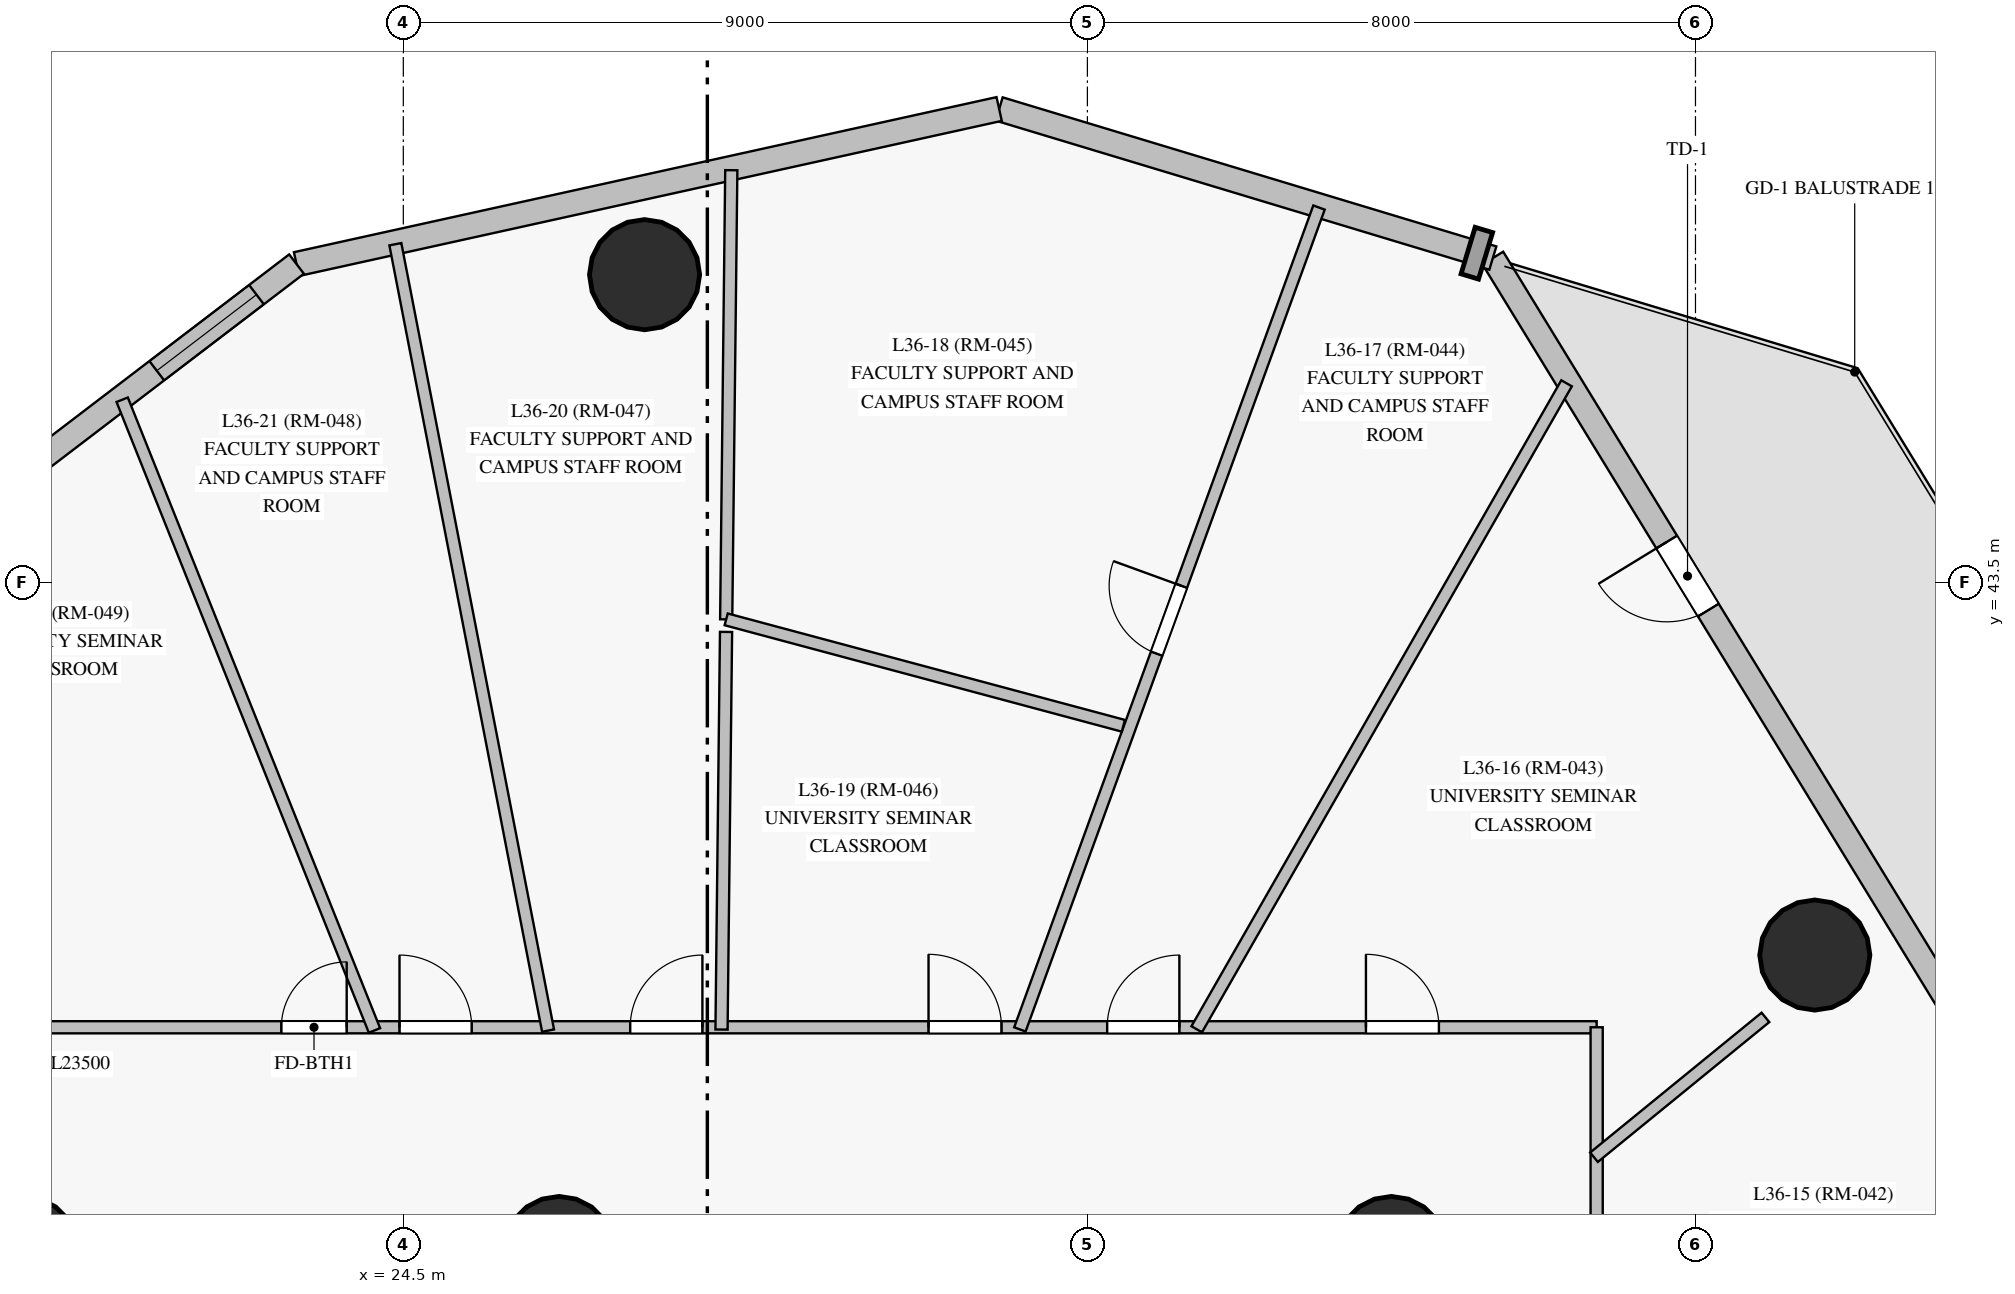
"""IFC4 building model, lengths in metres.
Left out: names, types, materials, properties, quantities, classifications, styles, units other than length and angle.
Written with IfcOpenShell. Run it as: python <this file> out.ifc"""

import sys

from ifc_helpers import new_model, si_unit, direction, frame, frame_2d, origin, origin_with_axes, origin_2d, place, context, subcontext, project, spatial, rectangle, circle, extrude, source, transform, mapped, element, fill, save


model = new_model("IFC4")
c1 = context("Model", 3, precision=1e-05, world=origin(), true_north=direction((0.0, 1.0)))
c2 = subcontext(c1, "Body", "Model", "MODEL_VIEW")
j1 = project(units=[si_unit("LENGTHUNIT", "METRE"), si_unit("PLANEANGLEUNIT", "RADIAN")], contexts=[c1])
p1 = place(None, origin())
s1 = spatial("IfcSite", under=j1, at=p1, CompositionType="ELEMENT")
p2 = place(p1, origin())
s2 = spatial("IfcBuilding", under=s1, at=p2, CompositionType="ELEMENT")
p3 = place(p2, frame((0.0, 0.0, 129.75)))
s3 = spatial("IfcBuildingStorey", under=s2, at=p3, CompositionType="ELEMENT", Elevation=129.75)
m1 = source(origin_with_axes(), c2, "Body", "SweptSolid", [
    extrude(circle(Radius=0.725, at=origin_2d()), origin(), (0.0, 0.0, 1.0), 3.05),
])
for number, where, z_axis, x_axis in (
    (1, (19.5, 34.7, 0.0), (0.0, 0.0, 1.0), (1.0, 0.0, 0.0)),
    (2, (26.55, 34.7, 0.0), (0.0, 0.0, 1.0), (1.0, 0.0, 0.0)),
    (3, (37.5, 34.7, 0.0), (0.0, 0.0, 1.0), (1.0, 0.0, 0.0)),
    (4, (43.07, 38.6, 0.0), (0.0, 0.0, 1.0), (1.0, 0.0, 0.0)),
    (5, (27.674, 47.551, 0.0), (0.0, 0.0, 1.0), (1.0, 0.0, 0.0)),
):
    element("IfcColumn", number, at=place(p3, frame(where, z_axis=z_axis, x_axis=x_axis)), inside=s3, PredefinedType="COLUMN", context=c2, shape_type="MappedRepresentation", body=[
        mapped(m1, transform((0.0, 0.0, 0.0), scale=1.0)),
    ])
p4 = place(p3, frame((47.615, 33.425, 0.0), z_axis=(0.0, 0.0, 1.0), x_axis=(-0.522110980626, 0.852877555051, 0.0)))
e6 = element("IfcWall", 6, at=p4, inside=s3, PredefinedType="SOLIDWALL", context=c2, shape_type="SweptSolid", body=[
    extrude(rectangle(XDim=16.819, YDim=0.32, at=frame_2d((8.41, 0.0))), origin(), (0.0, 0.0, 1.0), 2.495),
])
p5 = place(p4, frame((11.388, 0.0, 0.0)))
e7 = element("IfcOpeningElement", 7, at=p5, cuts=e6, PredefinedType="OPENING", context=c2, shape_type="SweptSolid", body=[
    extrude(rectangle(XDim=1.05, YDim=2.12, at=frame_2d((0.525, 1.06))), frame((0.0, 0.17, 0.0), z_axis=(0.0, -1.0, 0.0), x_axis=(1.0, 0.0, 0.0)), (0.0, 0.0, 1.0), 0.34),
])
p6 = place(p3, frame((38.834, 47.77, 0.0), z_axis=(0.0, 0.0, 1.0), x_axis=(-0.957328650051, 0.289001480606, 0.0)))
e8 = element("IfcWall", 8, at=p6, inside=s3, PredefinedType="SOLIDWALL", context=c2, shape_type="SweptSolid", body=[
    extrude(rectangle(XDim=6.784, YDim=0.32, at=frame_2d((3.392, 0.0))), origin(), (0.0, 0.0, 1.0), 2.495),
])
p7 = place(p3, frame((32.339, 49.731, 0.0), z_axis=(0.0, 0.0, 1.0), x_axis=(-0.97649735888, -0.215529367144, 0.0)))
e9 = element("IfcWall", 9, at=p7, inside=s3, PredefinedType="SOLIDWALL", context=c2, shape_type="SweptSolid", body=[
    extrude(rectangle(XDim=9.466, YDim=0.32, at=frame_2d((4.733, 0.0))), origin(), (0.0, 0.0, 1.0), 2.825),
])
p8 = place(p3, frame((23.095, 47.69, 0.0), z_axis=(0.0, 0.0, 1.0), x_axis=(-0.794946718948, -0.606679251363, 0.0)))
e10 = element("IfcWall", 10, at=p8, inside=s3, PredefinedType="SOLIDWALL", context=c2, shape_type="SweptSolid", body=[
    extrude(rectangle(XDim=13.689, YDim=0.32, at=frame_2d((6.844, 0.0))), origin(), (0.0, 0.0, 1.0), 2.825),
])
p9 = place(p8, frame((0.663, 0.0, 0.85)))
e11 = element("IfcOpeningElement", 11, at=p9, cuts=e10, PredefinedType="OPENING", context=c2, shape_type="SweptSolid", body=[
    extrude(rectangle(XDim=1.65, YDim=1.65, at=frame_2d((0.825, 0.825))), frame((0.0, 0.17, 0.0), z_axis=(0.0, -1.0, 0.0), x_axis=(1.0, 0.0, 0.0)), (0.0, 0.0, 1.0), 0.34),
])
p10 = place(p8, frame((4.929, 0.0, 0.85)))
e12 = element("IfcOpeningElement", 12, at=p10, cuts=e10, PredefinedType="OPENING", context=c2, shape_type="SweptSolid", body=[
    extrude(rectangle(XDim=1.65, YDim=1.65, at=frame_2d((0.825, 0.825))), frame((0.0, 0.17, 0.0), z_axis=(0.0, -1.0, 0.0), x_axis=(1.0, 0.0, 0.0)), (0.0, 0.0, 1.0), 0.34),
])
p11 = place(p8, frame((9.966, 0.0, 0.85)))
e13 = element("IfcOpeningElement", 13, at=p11, cuts=e10, PredefinedType="OPENING", context=c2, shape_type="SweptSolid", body=[
    extrude(rectangle(XDim=1.65, YDim=1.65, at=frame_2d((0.825, 0.825))), frame((0.0, 0.17, 0.0), z_axis=(0.0, -1.0, 0.0), x_axis=(1.0, 0.0, 0.0)), (0.0, 0.0, 1.0), 0.34),
])
p12 = place(p3, frame((16.7, 37.65, 0.0), z_axis=(0.0, 0.0, 1.0), x_axis=(1.0, 0.0, 0.0)))
e14 = element("IfcWall", 14, at=p12, inside=s3, PredefinedType="PARTITIONING", context=c2, shape_type="SweptSolid", body=[
    extrude(rectangle(XDim=23.5, YDim=0.16, at=frame_2d((11.75, 0.0))), origin(), (0.0, 0.0, 1.0), 2.325),
])
p13 = place(p12, frame((20.465, 0.0, 0.0)))
e15 = element("IfcOpeningElement", 15, at=p13, cuts=e14, PredefinedType="OPENING", context=c2, shape_type="SweptSolid", body=[
    extrude(rectangle(XDim=0.96, YDim=2.15, at=frame_2d((0.48, 1.075))), frame((0.0, 0.09, 0.0), z_axis=(0.0, -1.0, 0.0), x_axis=(1.0, 0.0, 0.0)), (0.0, 0.0, 1.0), 0.18),
])
p14 = place(p12, frame((17.06, 0.0, 0.0)))
e16 = element("IfcOpeningElement", 16, at=p14, cuts=e14, PredefinedType="OPENING", context=c2, shape_type="SweptSolid", body=[
    extrude(rectangle(XDim=0.95, YDim=2.15, at=frame_2d((0.475, 1.075))), frame((0.0, 0.09, 0.0), z_axis=(0.0, -1.0, 0.0), x_axis=(1.0, 0.0, 0.0)), (0.0, 0.0, 1.0), 0.18),
])
p15 = place(p12, frame((14.71, 0.0, 0.0)))
e17 = element("IfcOpeningElement", 17, at=p15, cuts=e14, PredefinedType="OPENING", context=c2, shape_type="SweptSolid", body=[
    extrude(rectangle(XDim=0.96, YDim=2.15, at=frame_2d((0.48, 1.075))), frame((0.0, 0.09, 0.0), z_axis=(0.0, -1.0, 0.0), x_axis=(1.0, 0.0, 0.0)), (0.0, 0.0, 1.0), 0.18),
])
p16 = place(p12, frame((10.785, 0.0, 0.0)))
e18 = element("IfcOpeningElement", 18, at=p16, cuts=e14, PredefinedType="OPENING", context=c2, shape_type="SweptSolid", body=[
    extrude(rectangle(XDim=0.95, YDim=2.15, at=frame_2d((0.475, 1.075))), frame((0.0, 0.09, 0.0), z_axis=(0.0, -1.0, 0.0), x_axis=(1.0, 0.0, 0.0)), (0.0, 0.0, 1.0), 0.18),
])
p17 = place(p12, frame((7.75, 0.0, 0.0)))
e19 = element("IfcOpeningElement", 19, at=p17, cuts=e14, PredefinedType="OPENING", context=c2, shape_type="SweptSolid", body=[
    extrude(rectangle(XDim=0.95, YDim=2.15, at=frame_2d((0.475, 1.075))), frame((0.0, 0.09, 0.0), z_axis=(0.0, -1.0, 0.0), x_axis=(1.0, 0.0, 0.0)), (0.0, 0.0, 1.0), 0.18),
])
p18 = place(p12, frame((6.195, 0.0, 0.0)))
e20 = element("IfcOpeningElement", 20, at=p18, cuts=e14, PredefinedType="OPENING", context=c2, shape_type="SweptSolid", body=[
    extrude(rectangle(XDim=0.86, YDim=2.1, at=frame_2d((0.43, 1.05))), frame((0.0, 0.09, 0.0), z_axis=(0.0, -1.0, 0.0), x_axis=(1.0, 0.0, 0.0)), (0.0, 0.0, 1.0), 0.18),
])
p19 = place(p3, frame((40.2, 37.65, 0.0), z_axis=(0.0, 0.0, 1.0), x_axis=(0.0, -1.0, 0.0)))
e21 = element("IfcWall", 21, at=p19, inside=s3, PredefinedType="PARTITIONING", context=c2, shape_type="SweptSolid", body=[
    extrude(rectangle(XDim=22.3, YDim=0.16, at=frame_2d((11.15, 0.0))), origin(), (0.0, 0.0, 1.0), 2.325),
])
p20 = place(p19, frame((14.02, 0.0, 0.0)))
e22 = element("IfcOpeningElement", 22, at=p20, cuts=e21, PredefinedType="OPENING", context=c2, shape_type="SweptSolid", body=[
    extrude(rectangle(XDim=0.95, YDim=2.15, at=frame_2d((0.475, 1.075))), frame((0.0, 0.09, 0.0), z_axis=(0.0, -1.0, 0.0), x_axis=(1.0, 0.0, 0.0)), (0.0, 0.0, 1.0), 0.18),
])
p21 = place(p19, frame((10.185, 0.0, 0.0)))
e23 = element("IfcOpeningElement", 23, at=p21, cuts=e21, PredefinedType="OPENING", context=c2, shape_type="SweptSolid", body=[
    extrude(rectangle(XDim=0.96, YDim=2.15, at=frame_2d((0.48, 1.075))), frame((0.0, 0.09, 0.0), z_axis=(0.0, -1.0, 0.0), x_axis=(1.0, 0.0, 0.0)), (0.0, 0.0, 1.0), 0.18),
])
p22 = place(p19, frame((7.33, 0.0, 0.0)))
e24 = element("IfcOpeningElement", 24, at=p22, cuts=e21, PredefinedType="OPENING", context=c2, shape_type="SweptSolid", body=[
    extrude(rectangle(XDim=0.95, YDim=2.15, at=frame_2d((0.475, 1.075))), frame((0.0, 0.09, 0.0), z_axis=(0.0, -1.0, 0.0), x_axis=(1.0, 0.0, 0.0)), (0.0, 0.0, 1.0), 0.18),
])
p23 = place(p19, frame((5.1, 0.0, 0.0)))
e25 = element("IfcOpeningElement", 25, at=p23, cuts=e21, PredefinedType="OPENING", context=c2, shape_type="SweptSolid", body=[
    extrude(rectangle(XDim=0.95, YDim=2.15, at=frame_2d((0.475, 1.075))), frame((0.0, 0.09, 0.0), z_axis=(0.0, -1.0, 0.0), x_axis=(1.0, 0.0, 0.0)), (0.0, 0.0, 1.0), 0.18),
])
p24 = place(p3, frame((32.612, 37.622, 0.0), z_axis=(0.0, 0.0, 1.0), x_axis=(0.342017337297, 0.939693642092, 0.0)))
e26 = element("IfcWall", 26, at=p24, inside=s3, PredefinedType="PARTITIONING", context=c2, shape_type="SweptSolid", body=[
    extrude(rectangle(XDim=11.506, YDim=0.16, at=frame_2d((5.753, 0.0))), origin(), (0.0, 0.0, 1.0), 2.825),
])
p25 = place(p24, frame((5.26, 0.0, 0.0)))
e27 = element("IfcOpeningElement", 27, at=p25, cuts=e26, PredefinedType="OPENING", context=c2, shape_type="SweptSolid", body=[
    extrude(rectangle(XDim=0.95, YDim=2.15, at=frame_2d((0.475, 1.075))), frame((0.0, 0.09, 0.0), z_axis=(0.0, -1.0, 0.0), x_axis=(1.0, 0.0, 0.0)), (0.0, 0.0, 1.0), 0.18),
])
p26 = place(p3, frame((26.405, 37.606, 0.0), z_axis=(0.0, 0.0, 1.0), x_axis=(-0.19062474147, 0.981662980834, 0.0)))
e28 = element("IfcWall", 28, at=p26, inside=s3, PredefinedType="PARTITIONING", context=c2, shape_type="SweptSolid", body=[
    extrude(rectangle(XDim=10.539, YDim=0.16, at=frame_2d((5.27, 0.0))), origin(), (0.0, 0.0, 1.0), 2.225),
])
p27 = place(p3, frame((34.938, 37.624, 0.0), z_axis=(0.0, 0.0, 1.0), x_axis=(0.496885166333, 0.867816300537, 0.0)))
e29 = element("IfcWall", 29, at=p27, inside=s3, PredefinedType="PARTITIONING", context=c2, shape_type="SweptSolid", body=[
    extrude(rectangle(XDim=9.792, YDim=0.16, at=frame_2d((4.896, 0.0))), origin(), (0.0, 0.0, 1.0), 2.825),
])
p28 = place(p3, frame((24.121, 37.608, 0.0), z_axis=(0.0, 0.0, 1.0), x_axis=(-0.37142835735, 0.9284616176, 0.0)))
e30 = element("IfcWall", 30, at=p28, inside=s3, PredefinedType="PARTITIONING", context=c2, shape_type="SweptSolid", body=[
    extrude(rectangle(XDim=8.937, YDim=0.16, at=frame_2d((4.468, 0.0))), origin(), (0.0, 0.0, 1.0), 2.825),
])
p29 = place(p3, frame((28.748, 43.016, 0.0), z_axis=(0.0, 0.0, 1.0), x_axis=(0.011402332573, 0.999934991293, 0.0)))
e31 = element("IfcWall", 31, at=p29, inside=s3, PredefinedType="PARTITIONING", context=c2, shape_type="SweptSolid", body=[
    extrude(rectangle(XDim=5.91, YDim=0.16, at=frame_2d((2.955, 0.0))), origin(), (0.0, 0.0, 1.0), 2.825),
])
p30 = place(p3, frame((33.973, 41.616, 0.0), z_axis=(0.0, 0.0, 1.0), x_axis=(-0.965924884927, 0.258822558289, 0.0)))
e32 = element("IfcWall", 32, at=p30, inside=s3, PredefinedType="PARTITIONING", context=c2, shape_type="SweptSolid", body=[
    extrude(rectangle(XDim=5.41, YDim=0.16, at=frame_2d((2.705, 0.0))), origin(), (0.0, 0.0, 1.0), 2.325),
])
p31 = place(p3, frame((28.687, 37.62, 0.0), z_axis=(0.0, 0.0, 1.0), x_axis=(0.011386763484, 0.999935168707, 0.0)))
e33 = element("IfcWall", 33, at=p31, inside=s3, PredefinedType="PARTITIONING", context=c2, shape_type="SweptSolid", body=[
    extrude(rectangle(XDim=5.231, YDim=0.16, at=frame_2d((2.616, 0.0))), origin(), (0.0, 0.0, 1.0), 2.825),
])
p32 = place(p3, frame((40.165, 35.94, 0.0), z_axis=(0.0, 0.0, 1.0), x_axis=(0.774801226036, 0.632204919415, 0.0)))
e34 = element("IfcWall", 34, at=p32, inside=s3, PredefinedType="PARTITIONING", context=c2, shape_type="SweptSolid", body=[
    extrude(rectangle(XDim=2.911, YDim=0.16, at=frame_2d((1.455, 0.0))), origin(), (0.0, 0.0, 1.0), 2.225),
])
m2 = source(origin_with_axes(), c2, "Body", "SweptSolid", [
    extrude(rectangle(XDim=1.65, YDim=1.65, at=frame_2d((0.825, 0.825))), frame((0.0, 0.03, 0.0), z_axis=(0.0, -1.0, 0.0), x_axis=(1.0, 0.0, 0.0)), (0.0, 0.0, 1.0), 0.06),
])
p33 = place(p9, origin())
e35 = element("IfcWindow", 35, at=p33, inside=s3, PartitioningType="SINGLE_PANEL", PredefinedType="WINDOW", context=c2, shape_type="MappedRepresentation", body=[
    mapped(m2, transform((0.0, 0.0, 0.0), scale=1.0)),
])
fill(e11, e35)
m3 = source(origin_with_axes(), c2, "Body", "SweptSolid", [
    extrude(rectangle(XDim=1.05, YDim=2.12, at=frame_2d((0.525, 1.06))), frame((0.0, 0.025, 0.0), z_axis=(0.0, -1.0, 0.0), x_axis=(1.0, 0.0, 0.0)), (0.0, 0.0, 1.0), 0.05),
])
p34 = place(p5, origin())
e36 = element("IfcDoor", 36, at=p34, inside=s3, OperationType="SINGLE_SWING_RIGHT", PredefinedType="DOOR", context=c2, shape_type="MappedRepresentation", body=[
    mapped(m3, transform((0.0, 0.0, 0.0), scale=1.0)),
])
fill(e7, e36)
m4 = source(origin_with_axes(), c2, "Body", "SweptSolid", [
    extrude(rectangle(XDim=0.96, YDim=2.15, at=frame_2d((0.48, 1.075))), frame((0.0, 0.025, 0.0), z_axis=(0.0, -1.0, 0.0), x_axis=(1.0, 0.0, 0.0)), (0.0, 0.0, 1.0), 0.05),
])
p35 = place(p13, origin())
e37 = element("IfcDoor", 37, at=p35, inside=s3, OperationType="SINGLE_SWING_LEFT", PredefinedType="DOOR", context=c2, shape_type="MappedRepresentation", body=[
    mapped(m4, transform((0.0, 0.0, 0.0), scale=1.0)),
])
fill(e15, e37)
m5 = source(origin_with_axes(), c2, "Body", "SweptSolid", [
    extrude(rectangle(XDim=0.95, YDim=2.15, at=frame_2d((0.475, 1.075))), frame((0.0, 0.025, 0.0), z_axis=(0.0, -1.0, 0.0), x_axis=(1.0, 0.0, 0.0)), (0.0, 0.0, 1.0), 0.05),
])
p36 = place(p14, origin())
e38 = element("IfcDoor", 38, at=p36, inside=s3, OperationType="SINGLE_SWING_RIGHT", PredefinedType="DOOR", context=c2, shape_type="MappedRepresentation", body=[
    mapped(m5, transform((0.0, 0.0, 0.0), scale=1.0)),
])
fill(e16, e38)
p37 = place(p15, origin())
e39 = element("IfcDoor", 39, at=p37, inside=s3, OperationType="SINGLE_SWING_LEFT", PredefinedType="DOOR", context=c2, shape_type="MappedRepresentation", body=[
    mapped(m4, transform((0.0, 0.0, 0.0), scale=1.0)),
])
fill(e17, e39)
p38 = place(p16, origin())
e40 = element("IfcDoor", 40, at=p38, inside=s3, OperationType="SINGLE_SWING_RIGHT", PredefinedType="DOOR", context=c2, shape_type="MappedRepresentation", body=[
    mapped(m5, transform((0.0, 0.0, 0.0), scale=1.0)),
])
fill(e18, e40)
p39 = place(p17, origin())
e41 = element("IfcDoor", 41, at=p39, inside=s3, OperationType="SINGLE_SWING_LEFT", PredefinedType="DOOR", context=c2, shape_type="MappedRepresentation", body=[
    mapped(m5, transform((0.0, 0.0, 0.0), scale=1.0)),
])
fill(e19, e41)
m6 = source(origin_with_axes(), c2, "Body", "SweptSolid", [
    extrude(rectangle(XDim=0.86, YDim=2.1, at=frame_2d((0.43, 1.05))), frame((0.0, 0.025, 0.0), z_axis=(0.0, -1.0, 0.0), x_axis=(1.0, 0.0, 0.0)), (0.0, 0.0, 1.0), 0.05),
])
p40 = place(p18, origin())
e42 = element("IfcDoor", 42, at=p40, inside=s3, OperationType="SINGLE_SWING_RIGHT", PredefinedType="DOOR", context=c2, shape_type="MappedRepresentation", body=[
    mapped(m6, transform((0.0, 0.0, 0.0), scale=1.0)),
])
fill(e20, e42)
p41 = place(p25, origin())
e43 = element("IfcDoor", 43, at=p41, inside=s3, OperationType="SINGLE_SWING_RIGHT", PredefinedType="DOOR", context=c2, shape_type="MappedRepresentation", body=[
    mapped(m5, transform((0.0, 0.0, 0.0), scale=1.0)),
])
fill(e27, e43)
save(model, sys.argv[1])
